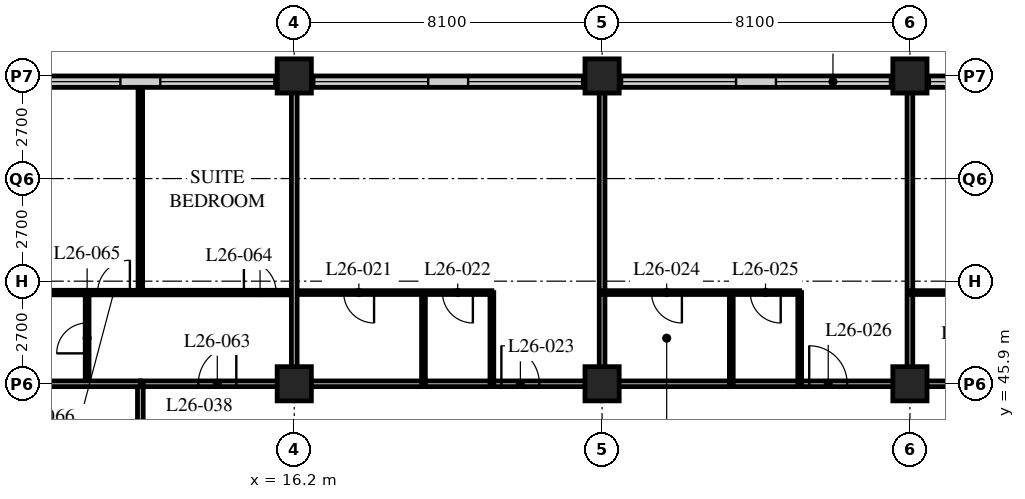
"""IFC4 building model, lengths in metres.
Left out: names, types, materials, properties, quantities, classifications, styles, units other than length and angle.
Written with IfcOpenShell. Run it as: python <this file> out.ifc"""

import sys

from ifc_helpers import new_model, si_unit, direction, frame, frame_2d, origin, origin_2d, place, context, subcontext, project, spatial, rectangle, hollow_rectangle, extrude, element, fill, save


model = new_model("IFC4")
c1 = context("Model", 3, precision=1e-05, world=origin(), true_north=direction((0.0, 1.0)))
c2 = subcontext(c1, "Body", "Model", "MODEL_VIEW")
j1 = project(units=[si_unit("LENGTHUNIT", "METRE"), si_unit("PLANEANGLEUNIT", "RADIAN")], contexts=[c1])
p1 = place(None, origin())
s1 = spatial("IfcSite", under=j1, at=p1, CompositionType="ELEMENT")
p2 = place(p1, origin())
s2 = spatial("IfcBuilding", under=s1, at=p2, CompositionType="ELEMENT")
p3 = place(p2, frame((0.0, 0.0, 106.8)))
s3 = spatial("IfcBuildingStorey", under=s2, at=p3, CompositionType="ELEMENT", Elevation=106.8)
for number, where, z_axis, x_axis in (
    (1, (16.2, 45.9, 0.0), (0.0, 0.0, 1.0), (1.0, 0.0, 0.0)),
    (2, (16.2, 54.0, 0.0), (0.0, 0.0, 1.0), (1.0, 0.0, 0.0)),
    (3, (24.3, 45.9, 0.0), (0.0, 0.0, 1.0), (1.0, 0.0, 0.0)),
    (4, (24.3, 54.0, 0.0), (0.0, 0.0, 1.0), (1.0, 0.0, 0.0)),
    (5, (32.4, 45.9, 0.0), (0.0, 0.0, 1.0), (1.0, 0.0, 0.0)),
    (6, (32.4, 54.0, 0.0), (0.0, 0.0, 1.0), (1.0, 0.0, 0.0)),
):
    element("IfcColumn", number, at=place(p3, frame(where, z_axis=z_axis, x_axis=x_axis)), inside=s3, PredefinedType="COLUMN", context=c2, shape_type="SweptSolid", body=[
        extrude(hollow_rectangle(XDim=0.9, YDim=0.9, WallThickness=0.09, at=origin_2d()), origin(), (0.0, 0.0, 1.0), 3.4),
    ])
p4 = place(p3, frame((48.3, 53.85, 0.0), z_axis=(0.0, 0.0, 1.0), x_axis=(-1.0, 0.0, 0.0)))
e7 = element("IfcWall", 7, at=p4, inside=s3, PredefinedType="SOLIDWALL", context=c2, shape_type="SweptSolid", body=[
    extrude(rectangle(XDim=40.2, YDim=0.3, at=frame_2d((20.1, 0.0))), origin(), (0.0, 0.0, 1.0), 3.19),
])
p5 = place(p4, frame((0.225, 0.0, 0.9)))
e8 = element("IfcOpeningElement", 8, at=p5, cuts=e7, PredefinedType="OPENING", context=c2, shape_type="SweptSolid", body=[
    extrude(rectangle(XDim=3.0, YDim=2.0, at=frame_2d((1.5, 1.0))), frame((0.0, 0.16, 0.0), z_axis=(0.0, -1.0, 0.0), x_axis=(1.0, 0.0, 0.0)), (0.0, 0.0, 1.0), 0.32),
])
p6 = place(p4, frame((4.275, 0.0, 0.9)))
e9 = element("IfcOpeningElement", 9, at=p6, cuts=e7, PredefinedType="OPENING", context=c2, shape_type="SweptSolid", body=[
    extrude(rectangle(XDim=3.0, YDim=2.0, at=frame_2d((1.5, 1.0))), frame((0.0, 0.16, 0.0), z_axis=(0.0, -1.0, 0.0), x_axis=(1.0, 0.0, 0.0)), (0.0, 0.0, 1.0), 0.32),
])
p7 = place(p4, frame((8.325, 0.0, 0.9)))
e10 = element("IfcOpeningElement", 10, at=p7, cuts=e7, PredefinedType="OPENING", context=c2, shape_type="SweptSolid", body=[
    extrude(rectangle(XDim=3.0, YDim=2.0, at=frame_2d((1.5, 1.0))), frame((0.0, 0.16, 0.0), z_axis=(0.0, -1.0, 0.0), x_axis=(1.0, 0.0, 0.0)), (0.0, 0.0, 1.0), 0.32),
])
p8 = place(p4, frame((12.375, 0.0, 0.9)))
e11 = element("IfcOpeningElement", 11, at=p8, cuts=e7, PredefinedType="OPENING", context=c2, shape_type="SweptSolid", body=[
    extrude(rectangle(XDim=3.0, YDim=2.0, at=frame_2d((1.5, 1.0))), frame((0.0, 0.16, 0.0), z_axis=(0.0, -1.0, 0.0), x_axis=(1.0, 0.0, 0.0)), (0.0, 0.0, 1.0), 0.32),
])
p9 = place(p4, frame((16.425, 0.0, 0.9)))
e12 = element("IfcOpeningElement", 12, at=p9, cuts=e7, PredefinedType="OPENING", context=c2, shape_type="SweptSolid", body=[
    extrude(rectangle(XDim=3.0, YDim=2.0, at=frame_2d((1.5, 1.0))), frame((0.0, 0.16, 0.0), z_axis=(0.0, -1.0, 0.0), x_axis=(1.0, 0.0, 0.0)), (0.0, 0.0, 1.0), 0.32),
])
p10 = place(p4, frame((20.475, 0.0, 0.9)))
e13 = element("IfcOpeningElement", 13, at=p10, cuts=e7, PredefinedType="OPENING", context=c2, shape_type="SweptSolid", body=[
    extrude(rectangle(XDim=3.0, YDim=2.0, at=frame_2d((1.5, 1.0))), frame((0.0, 0.16, 0.0), z_axis=(0.0, -1.0, 0.0), x_axis=(1.0, 0.0, 0.0)), (0.0, 0.0, 1.0), 0.32),
])
p11 = place(p4, frame((24.525, 0.0, 0.9)))
e14 = element("IfcOpeningElement", 14, at=p11, cuts=e7, PredefinedType="OPENING", context=c2, shape_type="SweptSolid", body=[
    extrude(rectangle(XDim=3.0, YDim=2.0, at=frame_2d((1.5, 1.0))), frame((0.0, 0.16, 0.0), z_axis=(0.0, -1.0, 0.0), x_axis=(1.0, 0.0, 0.0)), (0.0, 0.0, 1.0), 0.32),
])
p12 = place(p4, frame((28.575, 0.0, 0.9)))
e15 = element("IfcOpeningElement", 15, at=p12, cuts=e7, PredefinedType="OPENING", context=c2, shape_type="SweptSolid", body=[
    extrude(rectangle(XDim=3.0, YDim=2.0, at=frame_2d((1.5, 1.0))), frame((0.0, 0.16, 0.0), z_axis=(0.0, -1.0, 0.0), x_axis=(1.0, 0.0, 0.0)), (0.0, 0.0, 1.0), 0.32),
])
p13 = place(p4, frame((32.625, 0.0, 0.9)))
e16 = element("IfcOpeningElement", 16, at=p13, cuts=e7, PredefinedType="OPENING", context=c2, shape_type="SweptSolid", body=[
    extrude(rectangle(XDim=3.0, YDim=2.0, at=frame_2d((1.5, 1.0))), frame((0.0, 0.16, 0.0), z_axis=(0.0, -1.0, 0.0), x_axis=(1.0, 0.0, 0.0)), (0.0, 0.0, 1.0), 0.32),
])
p14 = place(p4, frame((36.675, 0.0, 0.9)))
e17 = element("IfcOpeningElement", 17, at=p14, cuts=e7, PredefinedType="OPENING", context=c2, shape_type="SweptSolid", body=[
    extrude(rectangle(XDim=3.0, YDim=2.0, at=frame_2d((1.5, 1.0))), frame((0.0, 0.16, 0.0), z_axis=(0.0, -1.0, 0.0), x_axis=(1.0, 0.0, 0.0)), (0.0, 0.0, 1.0), 0.32),
])
p15 = place(p3, frame((12.15, 45.9, 0.0), z_axis=(0.0, 0.0, 1.0), x_axis=(1.0, 0.0, 0.0)))
e18 = element("IfcWall", 18, at=p15, inside=s3, PredefinedType="PARTITIONING", context=c2, shape_type="SweptSolid", body=[
    extrude(rectangle(XDim=32.4, YDim=0.15, at=frame_2d((16.2, 0.0))), origin(), (0.0, 0.0, 1.0), 2.578),
])
p16 = place(p15, frame((9.5, 0.0, 0.0)))
e19 = element("IfcOpeningElement", 19, at=p16, cuts=e18, PredefinedType="OPENING", context=c2, shape_type="SweptSolid", body=[
    extrude(rectangle(XDim=1.0, YDim=2.1, at=frame_2d((0.5, 1.05))), frame((0.0, 0.085, 0.0), z_axis=(0.0, -1.0, 0.0), x_axis=(1.0, 0.0, 0.0)), (0.0, 0.0, 1.0), 0.17),
])
p17 = place(p15, frame((17.6, 0.0, 0.0)))
e20 = element("IfcOpeningElement", 20, at=p17, cuts=e18, PredefinedType="OPENING", context=c2, shape_type="SweptSolid", body=[
    extrude(rectangle(XDim=1.0, YDim=2.1, at=frame_2d((0.5, 1.05))), frame((0.0, 0.085, 0.0), z_axis=(0.0, -1.0, 0.0), x_axis=(1.0, 0.0, 0.0)), (0.0, 0.0, 1.0), 0.17),
])
p18 = place(p15, frame((25.7, 0.0, 0.0)))
e21 = element("IfcOpeningElement", 21, at=p18, cuts=e18, PredefinedType="OPENING", context=c2, shape_type="SweptSolid", body=[
    extrude(rectangle(XDim=1.0, YDim=2.1, at=frame_2d((0.5, 1.05))), frame((0.0, 0.085, 0.0), z_axis=(0.0, -1.0, 0.0), x_axis=(1.0, 0.0, 0.0)), (0.0, 0.0, 1.0), 0.17),
])
p19 = place(p15, frame((29.875, 0.0, 0.0)))
e22 = element("IfcOpeningElement", 22, at=p19, cuts=e18, PredefinedType="OPENING", context=c2, shape_type="SweptSolid", body=[
    extrude(rectangle(XDim=1.0, YDim=2.1, at=frame_2d((0.5, 1.05))), frame((0.0, 0.085, 0.0), z_axis=(0.0, -1.0, 0.0), x_axis=(1.0, 0.0, 0.0)), (0.0, 0.0, 1.0), 0.17),
])
p20 = place(p15, frame((1.525, 0.0, 0.0)))
e23 = element("IfcOpeningElement", 23, at=p20, cuts=e18, PredefinedType="OPENING", context=c2, shape_type="SweptSolid", body=[
    extrude(rectangle(XDim=1.0, YDim=2.1, at=frame_2d((0.5, 1.05))), frame((0.0, 0.085, 0.0), z_axis=(0.0, -1.0, 0.0), x_axis=(1.0, 0.0, 0.0)), (0.0, 0.0, 1.0), 0.17),
])
p21 = place(p3, frame((12.15, 21.6, 0.0), z_axis=(0.0, 0.0, 1.0), x_axis=(0.0, 1.0, 0.0)))
e24 = element("IfcWall", 24, at=p21, inside=s3, PredefinedType="PARTITIONING", context=c2, shape_type="SweptSolid", body=[
    extrude(rectangle(XDim=24.3, YDim=0.15, at=frame_2d((12.15, 0.0))), origin(), (0.0, 0.0, 1.0), 3.19),
])
p22 = place(p21, frame((5.45, 0.0, 0.0)))
e25 = element("IfcOpeningElement", 25, at=p22, cuts=e24, PredefinedType="OPENING", context=c2, shape_type="SweptSolid", body=[
    extrude(rectangle(XDim=1.0, YDim=2.1, at=frame_2d((0.5, 1.05))), frame((0.0, 0.085, 0.0), z_axis=(0.0, -1.0, 0.0), x_axis=(1.0, 0.0, 0.0)), (0.0, 0.0, 1.0), 0.17),
])
p23 = place(p21, frame((13.55, 0.0, 0.0)))
e26 = element("IfcOpeningElement", 26, at=p23, cuts=e24, PredefinedType="OPENING", context=c2, shape_type="SweptSolid", body=[
    extrude(rectangle(XDim=1.0, YDim=2.1, at=frame_2d((0.5, 1.05))), frame((0.0, 0.085, 0.0), z_axis=(0.0, -1.0, 0.0), x_axis=(1.0, 0.0, 0.0)), (0.0, 0.0, 1.0), 0.17),
])
p24 = place(p21, frame((21.65, 0.0, 0.0)))
e27 = element("IfcOpeningElement", 27, at=p24, cuts=e24, PredefinedType="OPENING", context=c2, shape_type="SweptSolid", body=[
    extrude(rectangle(XDim=1.0, YDim=2.1, at=frame_2d((0.5, 1.05))), frame((0.0, 0.085, 0.0), z_axis=(0.0, -1.0, 0.0), x_axis=(1.0, 0.0, 0.0)), (0.0, 0.0, 1.0), 0.17),
])
p25 = place(p3, frame((16.2, 48.3, 0.0), z_axis=(0.0, 0.0, 1.0), x_axis=(1.0, 0.0, 0.0)))
e28 = element("IfcWall", 28, at=p25, inside=s3, PredefinedType="PARTITIONING", context=c2, shape_type="SweptSolid", body=[
    extrude(rectangle(XDim=5.2, YDim=0.1, at=frame_2d((2.6, 0.0))), origin(), (0.0, 0.0, 1.0), 3.19),
])
p26 = place(p25, frame((1.3, 0.0, 0.0)))
e29 = element("IfcOpeningElement", 29, at=p26, cuts=e28, PredefinedType="OPENING", context=c2, shape_type="SweptSolid", body=[
    extrude(rectangle(XDim=0.8, YDim=2.1, at=frame_2d((0.4, 1.05))), frame((0.0, 0.06, 0.0), z_axis=(0.0, -1.0, 0.0), x_axis=(1.0, 0.0, 0.0)), (0.0, 0.0, 1.0), 0.12),
])
p27 = place(p25, frame((3.9, 0.0, 0.0)))
e30 = element("IfcOpeningElement", 30, at=p27, cuts=e28, PredefinedType="OPENING", context=c2, shape_type="SweptSolid", body=[
    extrude(rectangle(XDim=0.8, YDim=2.1, at=frame_2d((0.4, 1.05))), frame((0.0, 0.06, 0.0), z_axis=(0.0, -1.0, 0.0), x_axis=(1.0, 0.0, 0.0)), (0.0, 0.0, 1.0), 0.12),
])
for number, where, z_axis, x_axis in (
    (31, (19.6, 45.9, 0.0), (0.0, 0.0, 1.0), (0.0, 1.0, 0.0)),
    (32, (21.4, 45.9, 0.0), (0.0, 0.0, 1.0), (0.0, 1.0, 0.0)),
):
    element("IfcWall", number, at=place(p3, frame(where, z_axis=z_axis, x_axis=x_axis)), inside=s3, PredefinedType="PARTITIONING", context=c2, shape_type="SweptSolid", body=[
        extrude(rectangle(XDim=2.4, YDim=0.1, at=frame_2d((1.2, 0.0))), origin(), (0.0, 0.0, 1.0), 3.19),
    ])
p28 = place(p3, frame((24.3, 45.9, 0.0), z_axis=(0.0, 0.0, 1.0), x_axis=(0.0, 1.0, 0.0)))
e33 = element("IfcWall", 33, at=p28, inside=s3, PredefinedType="PARTITIONING", context=c2, shape_type="SweptSolid", body=[
    extrude(rectangle(XDim=7.8, YDim=0.15, at=frame_2d((3.9, 0.0))), origin(), (0.0, 0.0, 1.0), 2.578),
])
p29 = place(p3, frame((24.3, 48.3, 0.0), z_axis=(0.0, 0.0, 1.0), x_axis=(1.0, 0.0, 0.0)))
e34 = element("IfcWall", 34, at=p29, inside=s3, PredefinedType="PARTITIONING", context=c2, shape_type="SweptSolid", body=[
    extrude(rectangle(XDim=5.2, YDim=0.1, at=frame_2d((2.6, 0.0))), origin(), (0.0, 0.0, 1.0), 3.19),
])
p30 = place(p29, frame((1.3, 0.0, 0.0)))
e35 = element("IfcOpeningElement", 35, at=p30, cuts=e34, PredefinedType="OPENING", context=c2, shape_type="SweptSolid", body=[
    extrude(rectangle(XDim=0.8, YDim=2.1, at=frame_2d((0.4, 1.05))), frame((0.0, 0.06, 0.0), z_axis=(0.0, -1.0, 0.0), x_axis=(1.0, 0.0, 0.0)), (0.0, 0.0, 1.0), 0.12),
])
p31 = place(p29, frame((3.9, 0.0, 0.0)))
e36 = element("IfcOpeningElement", 36, at=p31, cuts=e34, PredefinedType="OPENING", context=c2, shape_type="SweptSolid", body=[
    extrude(rectangle(XDim=0.8, YDim=2.1, at=frame_2d((0.4, 1.05))), frame((0.0, 0.06, 0.0), z_axis=(0.0, -1.0, 0.0), x_axis=(1.0, 0.0, 0.0)), (0.0, 0.0, 1.0), 0.12),
])
for number, where, z_axis, x_axis in (
    (37, (27.7, 45.9, 0.0), (0.0, 0.0, 1.0), (0.0, 1.0, 0.0)),
    (38, (29.5, 45.9, 0.0), (0.0, 0.0, 1.0), (0.0, 1.0, 0.0)),
):
    element("IfcWall", number, at=place(p3, frame(where, z_axis=z_axis, x_axis=x_axis)), inside=s3, PredefinedType="PARTITIONING", context=c2, shape_type="SweptSolid", body=[
        extrude(rectangle(XDim=2.4, YDim=0.1, at=frame_2d((1.2, 0.0))), origin(), (0.0, 0.0, 1.0), 3.19),
    ])
p32 = place(p3, frame((32.4, 45.9, 0.0), z_axis=(0.0, 0.0, 1.0), x_axis=(0.0, 1.0, 0.0)))
e39 = element("IfcWall", 39, at=p32, inside=s3, PredefinedType="PARTITIONING", context=c2, shape_type="SweptSolid", body=[
    extrude(rectangle(XDim=7.8, YDim=0.15, at=frame_2d((3.9, 0.0))), origin(), (0.0, 0.0, 1.0), 2.578),
])
p33 = place(p3, frame((32.4, 48.3, 0.0), z_axis=(0.0, 0.0, 1.0), x_axis=(1.0, 0.0, 0.0)))
e40 = element("IfcWall", 40, at=p33, inside=s3, PredefinedType="PARTITIONING", context=c2, shape_type="SweptSolid", body=[
    extrude(rectangle(XDim=5.2, YDim=0.1, at=frame_2d((2.6, 0.0))), origin(), (0.0, 0.0, 1.0), 3.19),
])
p34 = place(p33, frame((1.3, 0.0, 0.0)))
e41 = element("IfcOpeningElement", 41, at=p34, cuts=e40, PredefinedType="OPENING", context=c2, shape_type="SweptSolid", body=[
    extrude(rectangle(XDim=0.8, YDim=2.1, at=frame_2d((0.4, 1.05))), frame((0.0, 0.06, 0.0), z_axis=(0.0, -1.0, 0.0), x_axis=(1.0, 0.0, 0.0)), (0.0, 0.0, 1.0), 0.12),
])
p35 = place(p33, frame((3.9, 0.0, 0.0)))
e42 = element("IfcOpeningElement", 42, at=p35, cuts=e40, PredefinedType="OPENING", context=c2, shape_type="SweptSolid", body=[
    extrude(rectangle(XDim=0.8, YDim=2.1, at=frame_2d((0.4, 1.05))), frame((0.0, 0.06, 0.0), z_axis=(0.0, -1.0, 0.0), x_axis=(1.0, 0.0, 0.0)), (0.0, 0.0, 1.0), 0.12),
])
p36 = place(p3, frame((10.75, 45.9, 0.0), z_axis=(0.0, 0.0, 1.0), x_axis=(0.0, 1.0, 0.0)))
e43 = element("IfcWall", 43, at=p36, inside=s3, PredefinedType="PARTITIONING", context=c2, shape_type="SweptSolid", body=[
    extrude(rectangle(XDim=2.4, YDim=0.1, at=frame_2d((1.2, 0.0))), origin(), (0.0, 0.0, 1.0), 3.19),
])
p37 = place(p36, frame((0.8, 0.0, 0.0)))
e44 = element("IfcOpeningElement", 44, at=p37, cuts=e43, PredefinedType="OPENING", context=c2, shape_type="SweptSolid", body=[
    extrude(rectangle(XDim=0.8, YDim=2.1, at=frame_2d((0.4, 1.05))), frame((0.0, 0.06, 0.0), z_axis=(0.0, -1.0, 0.0), x_axis=(1.0, 0.0, 0.0)), (0.0, 0.0, 1.0), 0.12),
])
p38 = place(p3, frame((8.15, 48.3, 0.0), z_axis=(0.0, 0.0, 1.0), x_axis=(1.0, 0.0, 0.0)))
e45 = element("IfcWall", 45, at=p38, inside=s3, PredefinedType="PARTITIONING", context=c2, shape_type="SweptSolid", body=[
    extrude(rectangle(XDim=8.05, YDim=0.12, at=frame_2d((4.025, 0.0))), origin(), (0.0, 0.0, 1.0), 3.19),
])
p39 = place(p38, frame((6.725, 0.0, 0.0)))
e46 = element("IfcOpeningElement", 46, at=p39, cuts=e45, PredefinedType="OPENING", context=c2, shape_type="SweptSolid", body=[
    extrude(rectangle(XDim=0.85, YDim=2.1, at=frame_2d((0.425, 1.05))), frame((0.0, 0.07, 0.0), z_axis=(0.0, -1.0, 0.0), x_axis=(1.0, 0.0, 0.0)), (0.0, 0.0, 1.0), 0.14),
])
p40 = place(p38, frame((2.875, 0.0, 0.0)))
e47 = element("IfcOpeningElement", 47, at=p40, cuts=e45, PredefinedType="OPENING", context=c2, shape_type="SweptSolid", body=[
    extrude(rectangle(XDim=0.85, YDim=2.1, at=frame_2d((0.425, 1.05))), frame((0.0, 0.07, 0.0), z_axis=(0.0, -1.0, 0.0), x_axis=(1.0, 0.0, 0.0)), (0.0, 0.0, 1.0), 0.14),
])
p41 = place(p3, frame((12.15, 48.3, 0.0), z_axis=(0.0, 0.0, 1.0), x_axis=(0.0, 1.0, 0.0)))
e48 = element("IfcWall", 48, at=p41, inside=s3, PredefinedType="PARTITIONING", context=c2, shape_type="SweptSolid", body=[
    extrude(rectangle(XDim=5.4, YDim=0.12, at=frame_2d((2.7, 0.0))), origin(), (0.0, 0.0, 1.0), 3.19),
])
p42 = place(p3, frame((4.35, 45.9, 0.0), z_axis=(0.0, 0.0, 1.0), x_axis=(1.0, 0.0, 0.0)))
e49 = element("IfcWall", 49, at=p42, inside=s3, PredefinedType="PARTITIONING", context=c2, shape_type="SweptSolid", body=[
    extrude(rectangle(XDim=7.8, YDim=0.15, at=frame_2d((3.9, 0.0))), origin(), (0.0, 0.0, 1.0), 2.578),
])
p43 = place(p3, frame((16.2, 45.9, 0.0), z_axis=(0.0, 0.0, 1.0), x_axis=(0.0, 1.0, 0.0)))
e50 = element("IfcWall", 50, at=p43, inside=s3, PredefinedType="PARTITIONING", context=c2, shape_type="SweptSolid", body=[
    extrude(rectangle(XDim=7.8, YDim=0.15, at=frame_2d((3.9, 0.0))), origin(), (0.0, 0.0, 1.0), 2.578),
])
p44 = place(p8, origin())
e51 = element("IfcWindow", 51, at=p44, inside=s3, PartitioningType="SINGLE_PANEL", PredefinedType="WINDOW", context=c2, shape_type="SweptSolid", body=[
    extrude(rectangle(XDim=3.0, YDim=2.0, at=frame_2d((1.5, 1.0))), frame((0.0, 0.03, 0.0), z_axis=(0.0, -1.0, 0.0), x_axis=(1.0, 0.0, 0.0)), (0.0, 0.0, 1.0), 0.06),
])
fill(e11, e51)
p45 = place(p9, origin())
e52 = element("IfcWindow", 52, at=p45, inside=s3, PartitioningType="SINGLE_PANEL", PredefinedType="WINDOW", context=c2, shape_type="SweptSolid", body=[
    extrude(rectangle(XDim=3.0, YDim=2.0, at=frame_2d((1.5, 1.0))), frame((0.0, 0.03, 0.0), z_axis=(0.0, -1.0, 0.0), x_axis=(1.0, 0.0, 0.0)), (0.0, 0.0, 1.0), 0.06),
])
fill(e12, e52)
p46 = place(p10, origin())
e53 = element("IfcWindow", 53, at=p46, inside=s3, PartitioningType="SINGLE_PANEL", PredefinedType="WINDOW", context=c2, shape_type="SweptSolid", body=[
    extrude(rectangle(XDim=3.0, YDim=2.0, at=frame_2d((1.5, 1.0))), frame((0.0, 0.03, 0.0), z_axis=(0.0, -1.0, 0.0), x_axis=(1.0, 0.0, 0.0)), (0.0, 0.0, 1.0), 0.06),
])
fill(e13, e53)
p47 = place(p11, origin())
e54 = element("IfcWindow", 54, at=p47, inside=s3, PartitioningType="SINGLE_PANEL", PredefinedType="WINDOW", context=c2, shape_type="SweptSolid", body=[
    extrude(rectangle(XDim=3.0, YDim=2.0, at=frame_2d((1.5, 1.0))), frame((0.0, 0.03, 0.0), z_axis=(0.0, -1.0, 0.0), x_axis=(1.0, 0.0, 0.0)), (0.0, 0.0, 1.0), 0.06),
])
fill(e14, e54)
p48 = place(p12, origin())
e55 = element("IfcWindow", 55, at=p48, inside=s3, PartitioningType="SINGLE_PANEL", PredefinedType="WINDOW", context=c2, shape_type="SweptSolid", body=[
    extrude(rectangle(XDim=3.0, YDim=2.0, at=frame_2d((1.5, 1.0))), frame((0.0, 0.03, 0.0), z_axis=(0.0, -1.0, 0.0), x_axis=(1.0, 0.0, 0.0)), (0.0, 0.0, 1.0), 0.06),
])
fill(e15, e55)
p49 = place(p13, origin())
e56 = element("IfcWindow", 56, at=p49, inside=s3, PartitioningType="SINGLE_PANEL", PredefinedType="WINDOW", context=c2, shape_type="SweptSolid", body=[
    extrude(rectangle(XDim=3.0, YDim=2.0, at=frame_2d((1.5, 1.0))), frame((0.0, 0.03, 0.0), z_axis=(0.0, -1.0, 0.0), x_axis=(1.0, 0.0, 0.0)), (0.0, 0.0, 1.0), 0.06),
])
fill(e16, e56)
p50 = place(p14, origin())
e57 = element("IfcWindow", 57, at=p50, inside=s3, PartitioningType="SINGLE_PANEL", PredefinedType="WINDOW", context=c2, shape_type="SweptSolid", body=[
    extrude(rectangle(XDim=3.0, YDim=2.0, at=frame_2d((1.5, 1.0))), frame((0.0, 0.03, 0.0), z_axis=(0.0, -1.0, 0.0), x_axis=(1.0, 0.0, 0.0)), (0.0, 0.0, 1.0), 0.06),
])
fill(e17, e57)
p51 = place(p26, origin())
e58 = element("IfcDoor", 58, at=p51, inside=s3, OperationType="SINGLE_SWING_LEFT", PredefinedType="DOOR", context=c2, shape_type="SweptSolid", body=[
    extrude(rectangle(XDim=0.8, YDim=2.1, at=frame_2d((0.4, 1.05))), frame((0.0, 0.025, 0.0), z_axis=(0.0, -1.0, 0.0), x_axis=(1.0, 0.0, 0.0)), (0.0, 0.0, 1.0), 0.05),
])
fill(e29, e58)
p52 = place(p27, origin())
e59 = element("IfcDoor", 59, at=p52, inside=s3, OperationType="SINGLE_SWING_LEFT", PredefinedType="DOOR", context=c2, shape_type="SweptSolid", body=[
    extrude(rectangle(XDim=0.8, YDim=2.1, at=frame_2d((0.4, 1.05))), frame((0.0, 0.025, 0.0), z_axis=(0.0, -1.0, 0.0), x_axis=(1.0, 0.0, 0.0)), (0.0, 0.0, 1.0), 0.05),
])
fill(e30, e59)
p53 = place(p16, origin())
e60 = element("IfcDoor", 60, at=p53, inside=s3, OperationType="SINGLE_SWING_LEFT", PredefinedType="DOOR", context=c2, shape_type="SweptSolid", body=[
    extrude(rectangle(XDim=1.0, YDim=2.1, at=frame_2d((0.5, 1.05))), frame((0.0, 0.025, 0.0), z_axis=(0.0, -1.0, 0.0), x_axis=(1.0, 0.0, 0.0)), (0.0, 0.0, 1.0), 0.05),
])
fill(e19, e60)
p54 = place(p30, origin())
e61 = element("IfcDoor", 61, at=p54, inside=s3, OperationType="SINGLE_SWING_LEFT", PredefinedType="DOOR", context=c2, shape_type="SweptSolid", body=[
    extrude(rectangle(XDim=0.8, YDim=2.1, at=frame_2d((0.4, 1.05))), frame((0.0, 0.025, 0.0), z_axis=(0.0, -1.0, 0.0), x_axis=(1.0, 0.0, 0.0)), (0.0, 0.0, 1.0), 0.05),
])
fill(e35, e61)
p55 = place(p31, origin())
e62 = element("IfcDoor", 62, at=p55, inside=s3, OperationType="SINGLE_SWING_LEFT", PredefinedType="DOOR", context=c2, shape_type="SweptSolid", body=[
    extrude(rectangle(XDim=0.8, YDim=2.1, at=frame_2d((0.4, 1.05))), frame((0.0, 0.025, 0.0), z_axis=(0.0, -1.0, 0.0), x_axis=(1.0, 0.0, 0.0)), (0.0, 0.0, 1.0), 0.05),
])
fill(e36, e62)
p56 = place(p17, origin())
e63 = element("IfcDoor", 63, at=p56, inside=s3, OperationType="SINGLE_SWING_LEFT", PredefinedType="DOOR", context=c2, shape_type="SweptSolid", body=[
    extrude(rectangle(XDim=1.0, YDim=2.1, at=frame_2d((0.5, 1.05))), frame((0.0, 0.025, 0.0), z_axis=(0.0, -1.0, 0.0), x_axis=(1.0, 0.0, 0.0)), (0.0, 0.0, 1.0), 0.05),
])
fill(e20, e63)
p57 = place(p20, origin())
e64 = element("IfcDoor", 64, at=p57, inside=s3, OperationType="SINGLE_SWING_RIGHT", PredefinedType="DOOR", context=c2, shape_type="SweptSolid", body=[
    extrude(rectangle(XDim=1.0, YDim=2.1, at=frame_2d((0.5, 1.05))), frame((0.0, 0.025, 0.0), z_axis=(0.0, -1.0, 0.0), x_axis=(1.0, 0.0, 0.0)), (0.0, 0.0, 1.0), 0.05),
])
fill(e23, e64)
p58 = place(p39, origin())
e65 = element("IfcDoor", 65, at=p58, inside=s3, OperationType="SINGLE_SWING_LEFT", PredefinedType="DOOR", context=c2, shape_type="SweptSolid", body=[
    extrude(rectangle(XDim=0.85, YDim=2.1, at=frame_2d((0.425, 1.05))), frame((0.0, 0.025, 0.0), z_axis=(0.0, -1.0, 0.0), x_axis=(1.0, 0.0, 0.0)), (0.0, 0.0, 1.0), 0.05),
])
fill(e46, e65)
p59 = place(p37, origin())
e66 = element("IfcDoor", 66, at=p59, inside=s3, OperationType="SINGLE_SWING_LEFT", PredefinedType="DOOR", context=c2, shape_type="SweptSolid", body=[
    extrude(rectangle(XDim=0.8, YDim=2.1, at=frame_2d((0.4, 1.05))), frame((0.0, 0.025, 0.0), z_axis=(0.0, -1.0, 0.0), x_axis=(1.0, 0.0, 0.0)), (0.0, 0.0, 1.0), 0.05),
])
fill(e44, e66)
p60 = place(p40, origin())
e67 = element("IfcDoor", 67, at=p60, inside=s3, OperationType="SINGLE_SWING_RIGHT", PredefinedType="DOOR", context=c2, shape_type="SweptSolid", body=[
    extrude(rectangle(XDim=0.85, YDim=2.1, at=frame_2d((0.425, 1.05))), frame((0.0, 0.025, 0.0), z_axis=(0.0, -1.0, 0.0), x_axis=(1.0, 0.0, 0.0)), (0.0, 0.0, 1.0), 0.05),
])
fill(e47, e67)
save(model, sys.argv[1])
